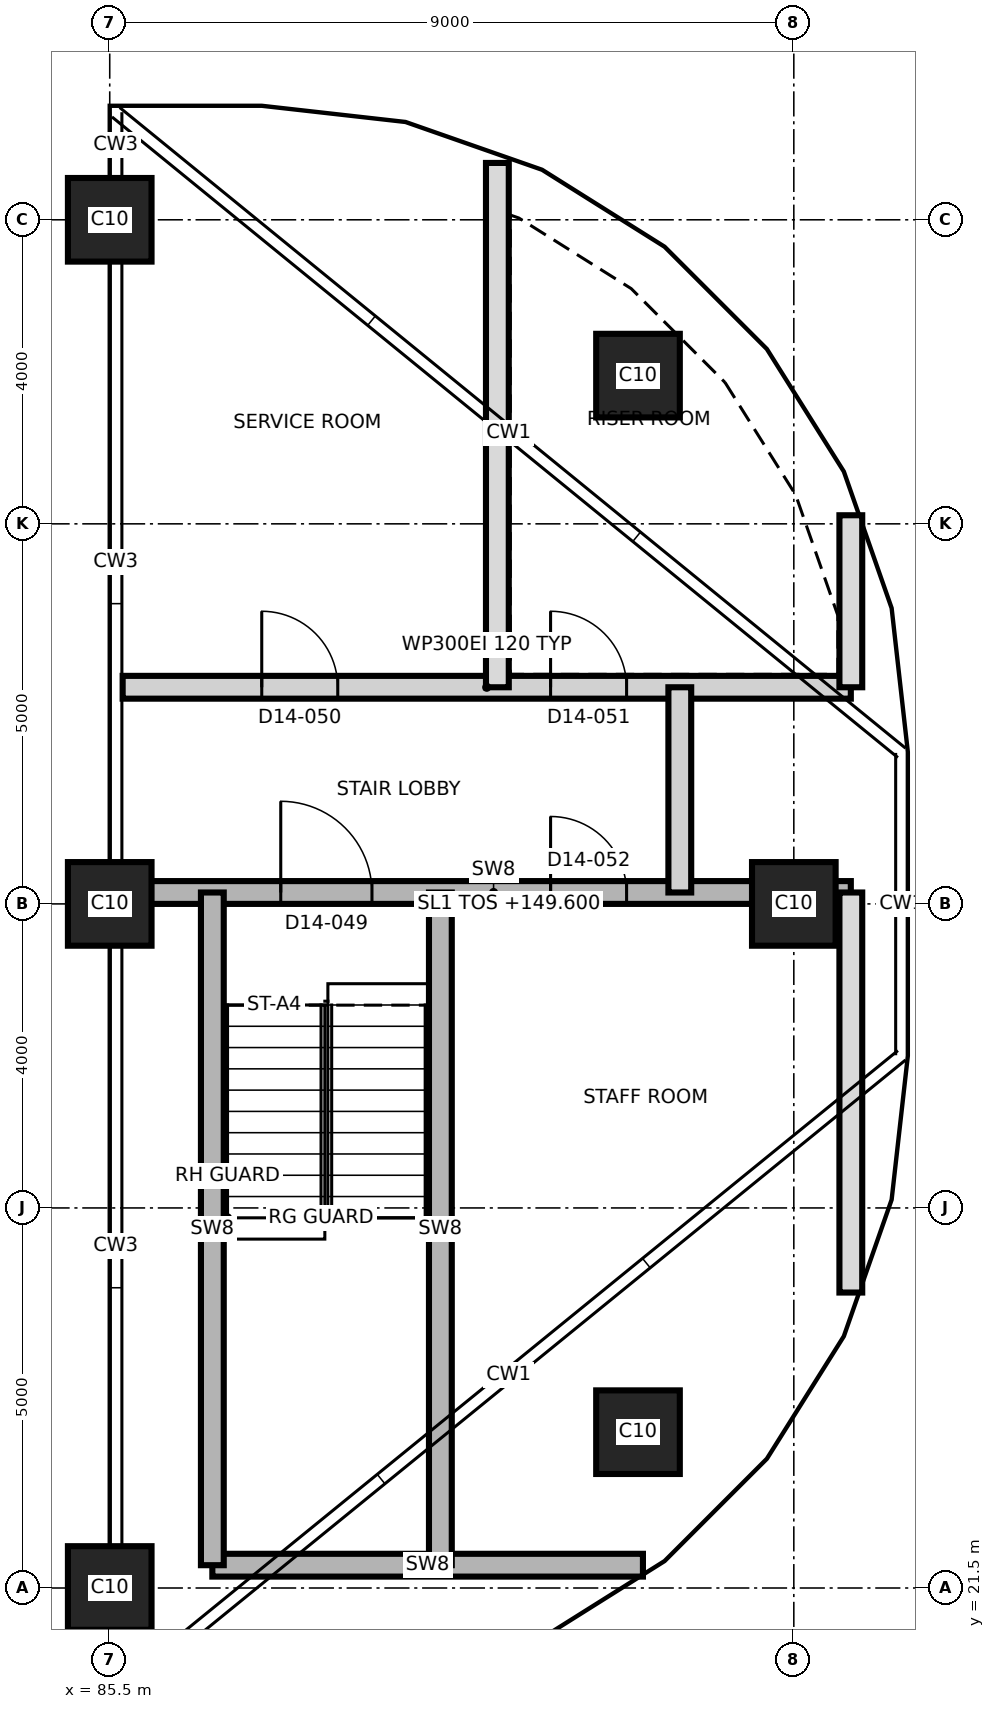
"""IFC4 building model, lengths in metres.
Left out: names, types, materials, properties, quantities, classifications, styles, units other than length and angle.
Written with IfcOpenShell. Run it as: python <this file> out.ifc"""

import sys

from ifc_helpers import new_model, si_unit, direction, frame, frame_2d, origin, origin_2d, place, context, subcontext, project, spatial, rectangle, extrude, element, fill, save


model = new_model("IFC4")
c1 = context("Model", 3, precision=1e-05, world=origin(), true_north=direction((0.0, 1.0)))
c2 = subcontext(c1, "Body", "Model", "MODEL_VIEW")
j1 = project(units=[si_unit("LENGTHUNIT", "METRE"), si_unit("PLANEANGLEUNIT", "RADIAN")], contexts=[c1])
p1 = place(None, origin())
s1 = spatial("IfcSite", under=j1, at=p1, CompositionType="ELEMENT")
p2 = place(p1, origin())
s2 = spatial("IfcBuilding", under=s1, at=p2, CompositionType="ELEMENT")
p3 = place(p2, frame((0.0, 0.0, 149.6)))
s3 = spatial("IfcBuildingStorey", under=s2, at=p3, CompositionType="ELEMENT", Elevation=149.6)
for number, where, z_axis, x_axis in (
    (1, (85.5, 21.5, 0.0), (0.0, 0.0, 1.0), (1.0, 0.0, 0.0)),
    (2, (92.45, 23.55, 0.0), (0.0, 0.0, 1.0), (1.0, 0.0, 0.0)),
    (3, (85.5, 30.5, 0.0), (0.0, 0.0, 1.0), (1.0, 0.0, 0.0)),
    (4, (94.5, 30.5, 0.0), (0.0, 0.0, 1.0), (1.0, 0.0, 0.0)),
    (5, (92.45, 37.45, 0.0), (0.0, 0.0, 1.0), (1.0, 0.0, 0.0)),
    (6, (85.5, 39.5, 0.0), (0.0, 0.0, 1.0), (1.0, 0.0, 0.0)),
):
    element("IfcColumn", number, at=place(p3, frame(where, z_axis=z_axis, x_axis=x_axis)), inside=s3, PredefinedType="COLUMN", context=c2, shape_type="SweptSolid", body=[
        extrude(rectangle(XDim=1.1, YDim=1.1, at=origin_2d()), origin(), (0.0, 0.0, 1.0), 3.7),
    ])
p4 = place(p3, frame((86.85, 21.8, 0.0), z_axis=(0.0, 0.0, 1.0), x_axis=(1.0, 0.0, 0.0)))
e7 = element("IfcWall", 7, at=p4, inside=s3, PredefinedType="SHEAR", context=c2, shape_type="SweptSolid", body=[
    extrude(rectangle(XDim=5.665, YDim=0.3, at=frame_2d((2.833, 0.0))), origin(), (0.0, 0.0, 1.0), 3.4),
])
p5 = place(p3, frame((85.85, 30.65, 0.0), z_axis=(0.0, 0.0, 1.0), x_axis=(1.0, 0.0, 0.0)))
e8 = element("IfcWall", 8, at=p5, inside=s3, PredefinedType="SHEAR", context=c2, shape_type="SweptSolid", body=[
    extrude(rectangle(XDim=9.4, YDim=0.3, at=frame_2d((4.7, 0.0))), origin(), (0.0, 0.0, 1.0), 3.4),
])
p6 = place(p5, frame((1.9, 0.0, 0.0)))
e9 = element("IfcOpeningElement", 9, at=p6, cuts=e8, PredefinedType="OPENING", context=c2, shape_type="SweptSolid", body=[
    extrude(rectangle(XDim=1.2, YDim=2.1, at=frame_2d((0.6, 1.05))), frame((0.0, 0.16, 0.0), z_axis=(0.0, -1.0, 0.0), x_axis=(1.0, 0.0, 0.0)), (0.0, 0.0, 1.0), 0.32),
])
p7 = place(p5, frame((5.45, 0.0, 0.0)))
e10 = element("IfcOpeningElement", 10, at=p7, cuts=e8, PredefinedType="OPENING", context=c2, shape_type="SweptSolid", body=[
    extrude(rectangle(XDim=1.0, YDim=2.1, at=frame_2d((0.5, 1.05))), frame((0.0, 0.16, 0.0), z_axis=(0.0, -1.0, 0.0), x_axis=(1.0, 0.0, 0.0)), (0.0, 0.0, 1.0), 0.32),
])
p8 = place(p3, frame((85.67, 33.35, 0.0), z_axis=(0.0, 0.0, 1.0), x_axis=(1.0, 0.0, 0.0)))
e11 = element("IfcWall", 11, at=p8, inside=s3, PredefinedType="PARTITIONING", context=c2, shape_type="SweptSolid", body=[
    extrude(rectangle(XDim=9.58, YDim=0.3, at=frame_2d((4.79, 0.0))), origin(), (0.0, 0.0, 1.0), 3.35),
])
p9 = place(p8, frame((1.83, 0.0, 0.0)))
e12 = element("IfcOpeningElement", 12, at=p9, cuts=e11, PredefinedType="OPENING", context=c2, shape_type="SweptSolid", body=[
    extrude(rectangle(XDim=1.0, YDim=2.1, at=frame_2d((0.5, 1.05))), frame((0.0, 0.16, 0.0), z_axis=(0.0, -1.0, 0.0), x_axis=(1.0, 0.0, 0.0)), (0.0, 0.0, 1.0), 0.32),
])
p10 = place(p8, frame((5.63, 0.0, 0.0)))
e13 = element("IfcOpeningElement", 13, at=p10, cuts=e11, PredefinedType="OPENING", context=c2, shape_type="SweptSolid", body=[
    extrude(rectangle(XDim=1.0, YDim=2.1, at=frame_2d((0.5, 1.05))), frame((0.0, 0.16, 0.0), z_axis=(0.0, -1.0, 0.0), x_axis=(1.0, 0.0, 0.0)), (0.0, 0.0, 1.0), 0.32),
])
for number, where, z_axis, x_axis in (
    (14, (86.85, 21.8, 0.0), (0.0, 0.0, 1.0), (0.0, 1.0, 0.0)),
    (15, (89.85, 21.8, 0.0), (0.0, 0.0, 1.0), (0.0, 1.0, 0.0)),
):
    element("IfcWall", number, at=place(p3, frame(where, z_axis=z_axis, x_axis=x_axis)), inside=s3, PredefinedType="SHEAR", context=c2, shape_type="SweptSolid", body=[
        extrude(rectangle(XDim=8.85, YDim=0.3, at=frame_2d((4.425, 0.0))), origin(), (0.0, 0.0, 1.0), 3.4),
    ])
p11 = place(p3, frame((90.6, 33.35, 0.0), z_axis=(0.0, 0.0, 1.0), x_axis=(0.0, 1.0, 0.0)))
e16 = element("IfcWall", 16, at=p11, inside=s3, PredefinedType="PARTITIONING", context=c2, shape_type="SweptSolid", body=[
    extrude(rectangle(XDim=6.898, YDim=0.3, at=frame_2d((3.449, 0.0))), origin(), (0.0, 0.0, 1.0), 3.35),
])
p12 = place(p3, frame((93.0, 30.65, 0.0), z_axis=(0.0, 0.0, 1.0), x_axis=(0.0, 1.0, 0.0)))
e17 = element("IfcWall", 17, at=p12, inside=s3, PredefinedType="PARTITIONING", context=c2, shape_type="SweptSolid", body=[
    extrude(rectangle(XDim=2.7, YDim=0.3, at=frame_2d((1.35, 0.0))), origin(), (0.0, 0.0, 1.0), 3.4),
])
p13 = place(p3, frame((95.25, 25.387, 0.0), z_axis=(0.0, 0.0, 1.0), x_axis=(0.0, 1.0, 0.0)))
e18 = element("IfcWall", 18, at=p13, inside=s3, PredefinedType="PARTITIONING", context=c2, shape_type="SweptSolid", body=[
    extrude(rectangle(XDim=5.263, YDim=0.3, at=frame_2d((2.631, 0.0))), origin(), (0.0, 0.0, 1.0), 3.35),
])
p14 = place(p3, frame((95.25, 33.35, 0.0), z_axis=(0.0, 0.0, 1.0), x_axis=(0.0, 1.0, 0.0)))
e19 = element("IfcWall", 19, at=p14, inside=s3, PredefinedType="PARTITIONING", context=c2, shape_type="SweptSolid", body=[
    extrude(rectangle(XDim=2.263, YDim=0.3, at=frame_2d((1.131, 0.0))), origin(), (0.0, 0.0, 1.0), 3.35),
])
p15 = place(p6, origin())
e20 = element("IfcDoor", 20, at=p15, inside=s3, OperationType="SINGLE_SWING_LEFT", PredefinedType="DOOR", context=c2, shape_type="SweptSolid", body=[
    extrude(rectangle(XDim=1.2, YDim=2.1, at=frame_2d((0.6, 1.05))), frame((0.0, 0.025, 0.0), z_axis=(0.0, -1.0, 0.0), x_axis=(1.0, 0.0, 0.0)), (0.0, 0.0, 1.0), 0.05),
])
fill(e9, e20)
p16 = place(p9, origin())
e21 = element("IfcDoor", 21, at=p16, inside=s3, OperationType="SINGLE_SWING_LEFT", PredefinedType="DOOR", context=c2, shape_type="SweptSolid", body=[
    extrude(rectangle(XDim=1.0, YDim=2.1, at=frame_2d((0.5, 1.05))), frame((0.0, 0.025, 0.0), z_axis=(0.0, -1.0, 0.0), x_axis=(1.0, 0.0, 0.0)), (0.0, 0.0, 1.0), 0.05),
])
fill(e12, e21)
p17 = place(p10, origin())
e22 = element("IfcDoor", 22, at=p17, inside=s3, OperationType="SINGLE_SWING_RIGHT", PredefinedType="DOOR", context=c2, shape_type="SweptSolid", body=[
    extrude(rectangle(XDim=1.0, YDim=2.1, at=frame_2d((0.5, 1.05))), frame((0.0, 0.025, 0.0), z_axis=(0.0, -1.0, 0.0), x_axis=(1.0, 0.0, 0.0)), (0.0, 0.0, 1.0), 0.05),
])
fill(e13, e22)
p18 = place(p7, origin())
e23 = element("IfcDoor", 23, at=p18, inside=s3, OperationType="SINGLE_SWING_LEFT", PredefinedType="DOOR", context=c2, shape_type="SweptSolid", body=[
    extrude(rectangle(XDim=1.0, YDim=2.1, at=frame_2d((0.5, 1.05))), frame((0.0, 0.025, 0.0), z_axis=(0.0, -1.0, 0.0), x_axis=(1.0, 0.0, 0.0)), (0.0, 0.0, 1.0), 0.05),
])
fill(e10, e23)
save(model, sys.argv[1])
